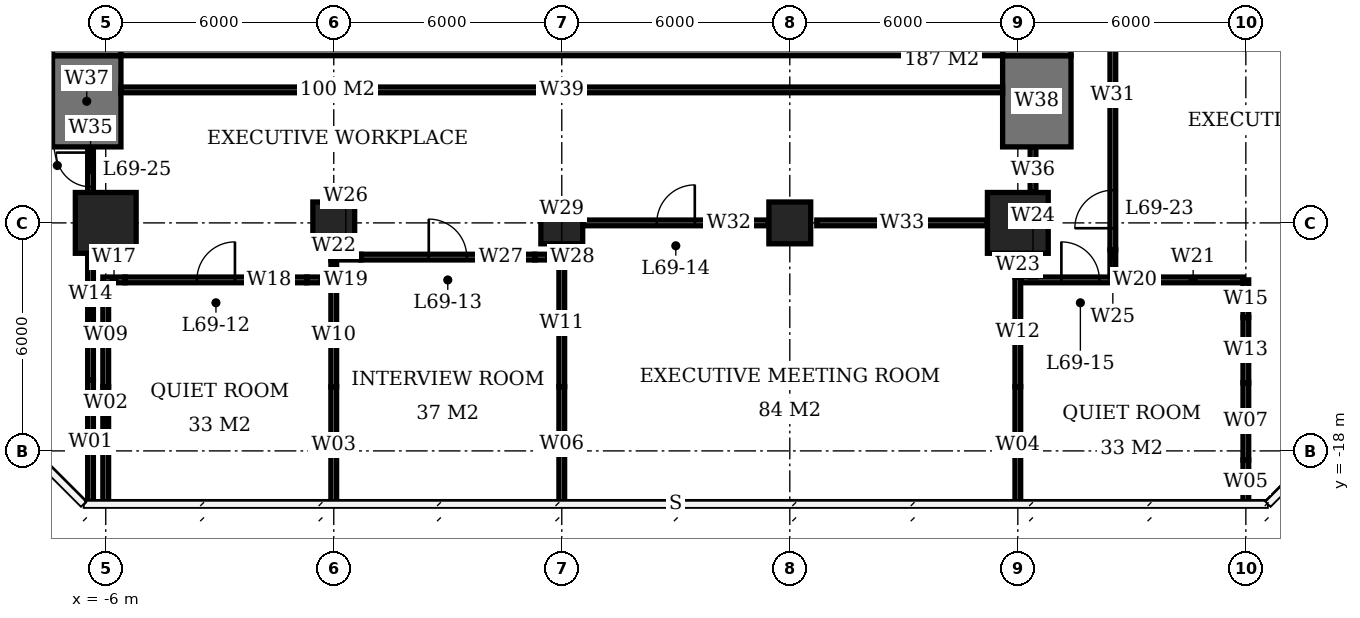
"""IFC4 building model, lengths in metres.
Left out: names, types, materials, properties, quantities, classifications, styles, units other than length and angle.
Written with IfcOpenShell. Run it as: python <this file> out.ifc"""

import sys

from ifc_helpers import new_model, si_unit, direction, frame, frame_2d, origin, origin_2d, place, context, subcontext, project, spatial, rectangle, extrude, element, fill, save


model = new_model("IFC4")
c1 = context("Model", 3, precision=1e-05, world=origin(), true_north=direction((0.0, 1.0)))
c2 = subcontext(c1, "Body", "Model", "MODEL_VIEW")
j1 = project(units=[si_unit("LENGTHUNIT", "METRE"), si_unit("PLANEANGLEUNIT", "RADIAN")], contexts=[c1])
p1 = place(None, origin())
s1 = spatial("IfcSite", under=j1, at=p1, CompositionType="ELEMENT")
p2 = place(p1, origin())
s2 = spatial("IfcBuilding", under=s1, at=p2, CompositionType="ELEMENT")
p3 = place(p2, frame((0.0, 0.0, 280.1)))
s3 = spatial("IfcBuildingStorey", under=s2, at=p3, CompositionType="ELEMENT", Elevation=280.1)
p4 = place(p3, frame((-6.0, -12.0, 0.0), z_axis=(0.0, 0.0, 1.0), x_axis=(1.0, 0.0, 0.0)))
e1 = element("IfcColumn", 1, at=p4, inside=s3, PredefinedType="COLUMN", context=c2, shape_type="SweptSolid", body=[
    extrude(rectangle(XDim=1.6, YDim=1.6, at=origin_2d()), origin(), (0.0, 0.0, 1.0), 3.9),
])
for number, where, z_axis, x_axis in (
    (2, (0.0, -12.0, 0.0), (0.0, 0.0, 1.0), (1.0, 0.0, 0.0)),
    (3, (6.0, -12.0, 0.0), (0.0, 0.0, 1.0), (1.0, 0.0, 0.0)),
    (4, (12.0, -12.0, 0.0), (0.0, 0.0, 1.0), (1.0, 0.0, 0.0)),
):
    element("IfcColumn", number, at=place(p3, frame(where, z_axis=z_axis, x_axis=x_axis)), inside=s3, PredefinedType="COLUMN", context=c2, shape_type="SweptSolid", body=[
        extrude(rectangle(XDim=1.1, YDim=1.1, at=origin_2d()), origin(), (0.0, 0.0, 1.0), 3.9),
    ])
p5 = place(p3, frame((18.0, -12.0, 0.0), z_axis=(0.0, 0.0, 1.0), x_axis=(1.0, 0.0, 0.0)))
e5 = element("IfcColumn", 5, at=p5, inside=s3, PredefinedType="COLUMN", context=c2, shape_type="SweptSolid", body=[
    extrude(rectangle(XDim=1.6, YDim=1.6, at=origin_2d()), origin(), (0.0, 0.0, 1.0), 3.9),
])
p6 = place(p3, frame((-5.6, -6.6, 0.0), z_axis=(0.0, 0.0, 1.0), x_axis=(1.0, 0.0, 0.0)))
e6 = element("IfcWall", 6, at=p6, inside=s3, PredefinedType="SHEAR", context=c2, shape_type="SweptSolid", body=[
    extrude(rectangle(XDim=23.2, YDim=2.0, at=frame_2d((11.6, 0.0))), origin(), (0.0, 0.0, 1.0), 3.9),
])
p7 = place(p3, frame((-6.5, -7.6, 0.0), z_axis=(0.0, 0.0, 1.0), x_axis=(0.0, 1.0, 0.0)))
e7 = element("IfcWall", 7, at=p7, inside=s3, PredefinedType="SHEAR", context=c2, shape_type="SweptSolid", body=[
    extrude(rectangle(XDim=21.2, YDim=1.8, at=frame_2d((10.6, 0.0))), origin(), (0.0, 0.0, 1.0), 3.9),
])
p8 = place(p7, frame((7.8, 0.0, 0.0)))
e8 = element("IfcOpeningElement", 8, at=p8, cuts=e7, PredefinedType="OPENING", context=c2, shape_type="SweptSolid", body=[
    extrude(rectangle(XDim=1.8, YDim=2.4, at=frame_2d((0.9, 1.2))), frame((0.0, 0.91, 0.0), z_axis=(0.0, -1.0, 0.0), x_axis=(1.0, 0.0, 0.0)), (0.0, 0.0, 1.0), 1.82),
])
p9 = place(p3, frame((18.5, -7.6, 0.0), z_axis=(0.0, 0.0, 1.0), x_axis=(0.0, 1.0, 0.0)))
e9 = element("IfcWall", 9, at=p9, inside=s3, PredefinedType="SHEAR", context=c2, shape_type="SweptSolid", body=[
    extrude(rectangle(XDim=21.2, YDim=1.8, at=frame_2d((10.6, 0.0))), origin(), (0.0, 0.0, 1.0), 3.9),
])
p10 = place(p9, frame((9.2, 0.0, 0.0)))
e10 = element("IfcOpeningElement", 10, at=p10, cuts=e9, PredefinedType="OPENING", context=c2, shape_type="SweptSolid", body=[
    extrude(rectangle(XDim=1.8, YDim=2.4, at=frame_2d((0.9, 1.2))), frame((0.0, 0.91, 0.0), z_axis=(0.0, -1.0, 0.0), x_axis=(1.0, 0.0, 0.0)), (0.0, 0.0, 1.0), 1.82),
])
for number, where, z_axis, x_axis in (
    (11, (-6.5, -10.0, 0.0), (0.0, 0.0, 1.0), (0.0, 1.0, 0.0)),
    (12, (18.5, -10.0, 0.0), (0.0, 0.0, 1.0), (0.0, 1.0, 0.0)),
):
    element("IfcWall", number, at=place(p3, frame(where, z_axis=z_axis, x_axis=x_axis)), inside=s3, PredefinedType="SHEAR", context=c2, shape_type="SweptSolid", body=[
        extrude(rectangle(XDim=2.4, YDim=1.8, at=frame_2d((1.2, 0.0))), origin(), (0.0, 0.0, 1.0), 3.9),
    ])
p11 = place(p3, frame((-6.075, -13.5, 0.0), z_axis=(0.0, 0.0, 1.0), x_axis=(1.0, 0.0, 0.0)))
e13 = element("IfcWall", 13, at=p11, inside=s3, PredefinedType="PARTITIONING", context=c2, shape_type="SweptSolid", body=[
    extrude(rectangle(XDim=0.585, YDim=0.15, at=frame_2d((0.292, 0.0))), origin(), (0.0, 0.0, 1.0), 2.65),
])
p12 = place(p3, frame((-5.49, -13.5, 0.0), z_axis=(0.0, 0.0, 1.0), x_axis=(1.0, 0.0, 0.0)))
e14 = element("IfcWall", 14, at=p12, inside=s3, PredefinedType="PARTITIONING", context=c2, shape_type="SweptSolid", body=[
    extrude(rectangle(XDim=4.78, YDim=0.15, at=frame_2d((2.39, 0.0))), origin(), (0.0, 0.0, 1.0), 3.65),
])
p13 = place(p12, frame((1.89, 0.0, 0.0)))
e15 = element("IfcOpeningElement", 15, at=p13, cuts=e14, PredefinedType="OPENING", context=c2, shape_type="SweptSolid", body=[
    extrude(rectangle(XDim=1.0, YDim=2.4, at=frame_2d((0.5, 1.2))), frame((0.0, 0.085, 0.0), z_axis=(0.0, -1.0, 0.0), x_axis=(1.0, 0.0, 0.0)), (0.0, 0.0, 1.0), 0.17),
])
p14 = place(p3, frame((-0.71, -13.5, 0.0), z_axis=(0.0, 0.0, 1.0), x_axis=(1.0, 0.0, 0.0)))
e16 = element("IfcWall", 16, at=p14, inside=s3, PredefinedType="PARTITIONING", context=c2, shape_type="SweptSolid", body=[
    extrude(rectangle(XDim=0.86, YDim=0.15, at=frame_2d((0.43, 0.0))), origin(), (0.0, 0.0, 1.0), 2.65),
])
p15 = place(p3, frame((18.075, -13.5, 0.0), z_axis=(0.0, 0.0, 1.0), x_axis=(1.0, 0.0, 0.0)))
e17 = element("IfcWall", 17, at=p15, inside=s3, PredefinedType="PARTITIONING", context=c2, shape_type="SweptSolid", body=[
    extrude(rectangle(XDim=3.217, YDim=0.15, at=frame_2d((1.608, 0.0))), origin(), (0.0, 0.0, 1.0), 2.65),
])
p16 = place(p15, frame((1.071, 0.0, 0.0)))
e18 = element("IfcOpeningElement", 18, at=p16, cuts=e17, PredefinedType="OPENING", context=c2, shape_type="SweptSolid", body=[
    extrude(rectangle(XDim=1.0, YDim=2.4, at=frame_2d((0.5, 1.2))), frame((0.0, 0.085, 0.0), z_axis=(0.0, -1.0, 0.0), x_axis=(1.0, 0.0, 0.0)), (0.0, 0.0, 1.0), 0.17),
])
p17 = place(p3, frame((21.292, -13.5, 0.0), z_axis=(0.0, 0.0, 1.0), x_axis=(1.0, 0.0, 0.0)))
e19 = element("IfcWall", 19, at=p17, inside=s3, PredefinedType="PARTITIONING", context=c2, shape_type="SweptSolid", body=[
    extrude(rectangle(XDim=2.643, YDim=0.15, at=frame_2d((1.322, 0.0))), origin(), (0.0, 0.0, 1.0), 3.65),
])
p18 = place(p3, frame((-0.075, -12.9, 0.0), z_axis=(0.0, 0.0, 1.0), x_axis=(1.0, 0.0, 0.0)))
e20 = element("IfcWall", 20, at=p18, inside=s3, PredefinedType="PARTITIONING", context=c2, shape_type="SweptSolid", body=[
    extrude(rectangle(XDim=0.785, YDim=0.15, at=frame_2d((0.393, 0.0))), origin(), (0.0, 0.0, 1.0), 2.65),
])
p19 = place(p3, frame((0.71, -12.9, 0.0), z_axis=(0.0, 0.0, 1.0), x_axis=(1.0, 0.0, 0.0)))
e21 = element("IfcWall", 21, at=p19, inside=s3, PredefinedType="PARTITIONING", context=c2, shape_type="SweptSolid", body=[
    extrude(rectangle(XDim=4.58, YDim=0.15, at=frame_2d((2.29, 0.0))), origin(), (0.0, 0.0, 1.0), 3.65),
])
p20 = place(p19, frame((1.79, 0.0, 0.0)))
e22 = element("IfcOpeningElement", 22, at=p20, cuts=e21, PredefinedType="OPENING", context=c2, shape_type="SweptSolid", body=[
    extrude(rectangle(XDim=1.0, YDim=2.4, at=frame_2d((0.5, 1.2))), frame((0.0, 0.085, 0.0), z_axis=(0.0, -1.0, 0.0), x_axis=(1.0, 0.0, 0.0)), (0.0, 0.0, 1.0), 0.17),
])
p21 = place(p3, frame((5.29, -12.9, 0.0), z_axis=(0.0, 0.0, 1.0), x_axis=(1.0, 0.0, 0.0)))
e23 = element("IfcWall", 23, at=p21, inside=s3, PredefinedType="PARTITIONING", context=c2, shape_type="SweptSolid", body=[
    extrude(rectangle(XDim=0.785, YDim=0.15, at=frame_2d((0.393, 0.0))), origin(), (0.0, 0.0, 1.0), 2.65),
])
p22 = place(p3, frame((6.56, -12.0, 0.0), z_axis=(0.0, 0.0, 1.0), x_axis=(1.0, 0.0, 0.0)))
e24 = element("IfcWall", 24, at=p22, inside=s3, PredefinedType="PARTITIONING", context=c2, shape_type="SweptSolid", body=[
    extrude(rectangle(XDim=4.88, YDim=0.15, at=frame_2d((2.44, 0.0))), origin(), (0.0, 0.0, 1.0), 3.65),
])
p23 = place(p22, frame((1.94, 0.0, 0.0)))
e25 = element("IfcOpeningElement", 25, at=p23, cuts=e24, PredefinedType="OPENING", context=c2, shape_type="SweptSolid", body=[
    extrude(rectangle(XDim=1.0, YDim=2.4, at=frame_2d((0.5, 1.2))), frame((0.0, 0.085, 0.0), z_axis=(0.0, -1.0, 0.0), x_axis=(1.0, 0.0, 0.0)), (0.0, 0.0, 1.0), 0.17),
])
p24 = place(p3, frame((12.71, -12.0, 0.0), z_axis=(0.0, 0.0, 1.0), x_axis=(1.0, 0.0, 0.0)))
e26 = element("IfcWall", 26, at=p24, inside=s3, PredefinedType="PARTITIONING", context=c2, shape_type="SweptSolid", body=[
    extrude(rectangle(XDim=4.49, YDim=0.15, at=frame_2d((2.245, 0.0))), origin(), (0.0, 0.0, 1.0), 3.65),
])
p25 = place(p3, frame((-6.0, -19.375, 0.0), z_axis=(0.0, 0.0, 1.0), x_axis=(0.0, 1.0, 0.0)))
e27 = element("IfcWall", 27, at=p25, inside=s3, PredefinedType="PARTITIONING", context=c2, shape_type="SweptSolid", body=[
    extrude(rectangle(XDim=3.065, YDim=0.15, at=frame_2d((1.532, 0.0))), origin(), (0.0, 0.0, 1.0), 3.65),
])
p26 = place(p3, frame((-6.0, -16.31, 0.0), z_axis=(0.0, 0.0, 1.0), x_axis=(0.0, 1.0, 0.0)))
e28 = element("IfcWall", 28, at=p26, inside=s3, PredefinedType="PARTITIONING", context=c2, shape_type="SweptSolid", body=[
    extrude(rectangle(XDim=2.735, YDim=0.15, at=frame_2d((1.368, 0.0))), origin(), (0.0, 0.0, 1.0), 2.65),
])
p27 = place(p3, frame((0.0, -19.375, 0.0), z_axis=(0.0, 0.0, 1.0), x_axis=(0.0, 1.0, 0.0)))
e29 = element("IfcWall", 29, at=p27, inside=s3, PredefinedType="PARTITIONING", context=c2, shape_type="SweptSolid", body=[
    extrude(rectangle(XDim=3.065, YDim=0.15, at=frame_2d((1.532, 0.0))), origin(), (0.0, 0.0, 1.0), 3.65),
])
p28 = place(p3, frame((0.0, -16.31, 0.0), z_axis=(0.0, 0.0, 1.0), x_axis=(0.0, 1.0, 0.0)))
e30 = element("IfcWall", 30, at=p28, inside=s3, PredefinedType="PARTITIONING", context=c2, shape_type="SweptSolid", body=[
    extrude(rectangle(XDim=2.735, YDim=0.15, at=frame_2d((1.368, 0.0))), origin(), (0.0, 0.0, 1.0), 2.65),
])
p29 = place(p3, frame((0.0, -13.425, 0.0), z_axis=(0.0, 0.0, 1.0), x_axis=(0.0, 1.0, 0.0)))
e31 = element("IfcWall", 31, at=p29, inside=s3, PredefinedType="PARTITIONING", context=c2, shape_type="SweptSolid", body=[
    extrude(rectangle(XDim=0.45, YDim=0.15, at=frame_2d((0.225, 0.0))), origin(), (0.0, 0.0, 1.0), 2.65),
])
p30 = place(p3, frame((6.0, -19.35, 0.0), z_axis=(0.0, 0.0, 1.0), x_axis=(0.0, 1.0, 0.0)))
e32 = element("IfcWall", 32, at=p30, inside=s3, PredefinedType="PARTITIONING", context=c2, shape_type="SweptSolid", body=[
    extrude(rectangle(XDim=3.04, YDim=0.15, at=frame_2d((1.52, 0.0))), origin(), (0.0, 0.0, 1.0), 3.65),
])
p31 = place(p3, frame((6.0, -16.31, 0.0), z_axis=(0.0, 0.0, 1.0), x_axis=(0.0, 1.0, 0.0)))
e33 = element("IfcWall", 33, at=p31, inside=s3, PredefinedType="PARTITIONING", context=c2, shape_type="SweptSolid", body=[
    extrude(rectangle(XDim=3.335, YDim=0.15, at=frame_2d((1.667, 0.0))), origin(), (0.0, 0.0, 1.0), 2.65),
])
p32 = place(p3, frame((6.0, -12.9, 0.0), z_axis=(0.0, 0.0, 1.0), x_axis=(0.0, 1.0, 0.0)))
e34 = element("IfcWall", 34, at=p32, inside=s3, PredefinedType="PARTITIONING", context=c2, shape_type="SweptSolid", body=[
    extrude(rectangle(XDim=0.35, YDim=0.15, at=frame_2d((0.175, 0.0))), origin(), (0.0, 0.0, 1.0), 2.65),
])
p33 = place(p3, frame((18.0, -19.375, 0.0), z_axis=(0.0, 0.0, 1.0), x_axis=(0.0, 1.0, 0.0)))
e35 = element("IfcWall", 35, at=p33, inside=s3, PredefinedType="PARTITIONING", context=c2, shape_type="SweptSolid", body=[
    extrude(rectangle(XDim=3.065, YDim=0.15, at=frame_2d((1.532, 0.0))), origin(), (0.0, 0.0, 1.0), 3.65),
])
p34 = place(p3, frame((18.0, -16.31, 0.0), z_axis=(0.0, 0.0, 1.0), x_axis=(0.0, 1.0, 0.0)))
e36 = element("IfcWall", 36, at=p34, inside=s3, PredefinedType="PARTITIONING", context=c2, shape_type="SweptSolid", body=[
    extrude(rectangle(XDim=2.885, YDim=0.15, at=frame_2d((1.442, 0.0))), origin(), (0.0, 0.0, 1.0), 2.65),
])
p35 = place(p3, frame((18.0, -13.425, 0.0), z_axis=(0.0, 0.0, 1.0), x_axis=(0.0, 1.0, 0.0)))
e37 = element("IfcWall", 37, at=p35, inside=s3, PredefinedType="PARTITIONING", context=c2, shape_type="SweptSolid", body=[
    extrude(rectangle(XDim=0.625, YDim=0.15, at=frame_2d((0.312, 0.0))), origin(), (0.0, 0.0, 1.0), 2.65),
])
p36 = place(p3, frame((24.0, -19.375, 0.0), z_axis=(0.0, 0.0, 1.0), x_axis=(0.0, 1.0, 0.0)))
e38 = element("IfcWall", 38, at=p36, inside=s3, PredefinedType="PARTITIONING", context=c2, shape_type="SweptSolid", body=[
    extrude(rectangle(XDim=1.138, YDim=0.15, at=frame_2d((0.569, 0.0))), origin(), (0.0, 0.0, 1.0), 3.65),
])
p37 = place(p3, frame((24.0, -18.237, 0.0), z_axis=(0.0, 0.0, 1.0), x_axis=(0.0, 1.0, 0.0)))
e39 = element("IfcWall", 39, at=p37, inside=s3, PredefinedType="PARTITIONING", context=c2, shape_type="SweptSolid", body=[
    extrude(rectangle(XDim=2.029, YDim=0.15, at=frame_2d((1.015, 0.0))), origin(), (0.0, 0.0, 1.0), 2.65),
])
p38 = place(p3, frame((24.0, -16.208, 0.0), z_axis=(0.0, 0.0, 1.0), x_axis=(0.0, 1.0, 0.0)))
e40 = element("IfcWall", 40, at=p38, inside=s3, PredefinedType="PARTITIONING", context=c2, shape_type="SweptSolid", body=[
    extrude(rectangle(XDim=1.718, YDim=0.15, at=frame_2d((0.859, 0.0))), origin(), (0.0, 0.0, 1.0), 3.65),
])
p39 = place(p3, frame((24.0, -14.49, 0.0), z_axis=(0.0, 0.0, 1.0), x_axis=(0.0, 1.0, 0.0)))
e41 = element("IfcWall", 41, at=p39, inside=s3, PredefinedType="PARTITIONING", context=c2, shape_type="SweptSolid", body=[
    extrude(rectangle(XDim=0.99, YDim=0.15, at=frame_2d((0.495, 0.0))), origin(), (0.0, 0.0, 1.0), 2.65),
])
p40 = place(p3, frame((-6.4, -19.375, 0.0), z_axis=(0.0, 0.0, 1.0), x_axis=(0.0, 1.0, 0.0)))
e42 = element("IfcWall", 42, at=p40, inside=s3, PredefinedType="PARTITIONING", context=c2, shape_type="SweptSolid", body=[
    extrude(rectangle(XDim=3.235, YDim=0.15, at=frame_2d((1.618, 0.0))), origin(), (0.0, 0.0, 1.0), 3.65),
])
p41 = place(p3, frame((-6.4, -16.14, 0.0), z_axis=(0.0, 0.0, 1.0), x_axis=(0.0, 1.0, 0.0)))
e43 = element("IfcWall", 43, at=p41, inside=s3, PredefinedType="PARTITIONING", context=c2, shape_type="SweptSolid", body=[
    extrude(rectangle(XDim=3.34, YDim=0.15, at=frame_2d((1.67, 0.0))), origin(), (0.0, 0.0, 1.0), 2.65),
])
p42 = place(p3, frame((-6.4, -11.2, 0.0), z_axis=(0.0, 0.0, 1.0), x_axis=(0.0, 1.0, 0.0)))
e44 = element("IfcWall", 44, at=p42, inside=s3, PredefinedType="PARTITIONING", context=c2, shape_type="SweptSolid", body=[
    extrude(rectangle(XDim=1.2, YDim=0.15, at=frame_2d((0.6, 0.0))), origin(), (0.0, 0.0, 1.0), 3.65),
])
p43 = place(p42, frame((0.15, 0.0, 0.0)))
e45 = element("IfcOpeningElement", 45, at=p43, cuts=e44, PredefinedType="OPENING", context=c2, shape_type="SweptSolid", body=[
    extrude(rectangle(XDim=0.9, YDim=2.1, at=frame_2d((0.45, 1.05))), frame((0.0, 0.085, 0.0), z_axis=(0.0, -1.0, 0.0), x_axis=(1.0, 0.0, 0.0)), (0.0, 0.0, 1.0), 0.17),
])
p44 = place(p3, frame((-5.6, -8.5, 0.0), z_axis=(0.0, 0.0, 1.0), x_axis=(1.0, 0.0, 0.0)))
e46 = element("IfcWall", 46, at=p44, inside=s3, PredefinedType="PARTITIONING", context=c2, shape_type="SweptSolid", body=[
    extrude(rectangle(XDim=23.2, YDim=0.15, at=frame_2d((11.6, 0.0))), origin(), (0.0, 0.0, 1.0), 3.65),
])
p45 = place(p3, frame((18.4, -13.425, 0.0), z_axis=(0.0, 0.0, 1.0), x_axis=(0.0, 1.0, 0.0)))
e47 = element("IfcWall", 47, at=p45, inside=s3, PredefinedType="PARTITIONING", context=c2, shape_type="SweptSolid", body=[
    extrude(rectangle(XDim=0.625, YDim=0.15, at=frame_2d((0.312, 0.0))), origin(), (0.0, 0.0, 1.0), 2.65),
])
p46 = place(p3, frame((18.4, -11.2, 0.0), z_axis=(0.0, 0.0, 1.0), x_axis=(0.0, 1.0, 0.0)))
e48 = element("IfcWall", 48, at=p46, inside=s3, PredefinedType="PARTITIONING", context=c2, shape_type="SweptSolid", body=[
    extrude(rectangle(XDim=1.2, YDim=0.15, at=frame_2d((0.6, 0.0))), origin(), (0.0, 0.0, 1.0), 3.65),
])
p47 = place(p3, frame((20.5, -13.425, 0.0), z_axis=(0.0, 0.0, 1.0), x_axis=(0.0, 1.0, 0.0)))
e49 = element("IfcWall", 49, at=p47, inside=s3, PredefinedType="PARTITIONING", context=c2, shape_type="SweptSolid", body=[
    extrude(rectangle(XDim=0.717, YDim=0.15, at=frame_2d((0.358, 0.0))), origin(), (0.0, 0.0, 1.0), 2.65),
])
p48 = place(p3, frame((20.5, -12.708, 0.0), z_axis=(0.0, 0.0, 1.0), x_axis=(0.0, 1.0, 0.0)))
e50 = element("IfcWall", 50, at=p48, inside=s3, PredefinedType="PARTITIONING", context=c2, shape_type="SweptSolid", body=[
    extrude(rectangle(XDim=8.133, YDim=0.15, at=frame_2d((4.066, 0.0))), origin(), (0.0, 0.0, 1.0), 3.65),
])
p49 = place(p48, frame((0.568, 0.0, 0.0)))
e51 = element("IfcOpeningElement", 51, at=p49, cuts=e50, PredefinedType="OPENING", context=c2, shape_type="SweptSolid", body=[
    extrude(rectangle(XDim=1.0, YDim=2.4, at=frame_2d((0.5, 1.2))), frame((0.0, 0.085, 0.0), z_axis=(0.0, -1.0, 0.0), x_axis=(1.0, 0.0, 0.0)), (0.0, 0.0, 1.0), 0.17),
])
p50 = place(p13, origin())
e52 = element("IfcDoor", 52, at=p50, inside=s3, OperationType="SINGLE_SWING_RIGHT", PredefinedType="DOOR", context=c2, shape_type="SweptSolid", body=[
    extrude(rectangle(XDim=1.0, YDim=2.4, at=frame_2d((0.5, 1.2))), frame((0.0, 0.025, 0.0), z_axis=(0.0, -1.0, 0.0), x_axis=(1.0, 0.0, 0.0)), (0.0, 0.0, 1.0), 0.05),
])
fill(e15, e52)
p51 = place(p20, origin())
e53 = element("IfcDoor", 53, at=p51, inside=s3, OperationType="SINGLE_SWING_LEFT", PredefinedType="DOOR", context=c2, shape_type="SweptSolid", body=[
    extrude(rectangle(XDim=1.0, YDim=2.4, at=frame_2d((0.5, 1.2))), frame((0.0, 0.025, 0.0), z_axis=(0.0, -1.0, 0.0), x_axis=(1.0, 0.0, 0.0)), (0.0, 0.0, 1.0), 0.05),
])
fill(e22, e53)
p52 = place(p23, origin())
e54 = element("IfcDoor", 54, at=p52, inside=s3, OperationType="SINGLE_SWING_RIGHT", PredefinedType="DOOR", context=c2, shape_type="SweptSolid", body=[
    extrude(rectangle(XDim=1.0, YDim=2.4, at=frame_2d((0.5, 1.2))), frame((0.0, 0.025, 0.0), z_axis=(0.0, -1.0, 0.0), x_axis=(1.0, 0.0, 0.0)), (0.0, 0.0, 1.0), 0.05),
])
fill(e25, e54)
p53 = place(p16, origin())
e55 = element("IfcDoor", 55, at=p53, inside=s3, OperationType="SINGLE_SWING_LEFT", PredefinedType="DOOR", context=c2, shape_type="SweptSolid", body=[
    extrude(rectangle(XDim=1.0, YDim=2.4, at=frame_2d((0.5, 1.2))), frame((0.0, 0.025, 0.0), z_axis=(0.0, -1.0, 0.0), x_axis=(1.0, 0.0, 0.0)), (0.0, 0.0, 1.0), 0.05),
])
fill(e18, e55)
p54 = place(p49, origin())
e56 = element("IfcDoor", 56, at=p54, inside=s3, OperationType="SINGLE_SWING_LEFT", PredefinedType="DOOR", context=c2, shape_type="SweptSolid", body=[
    extrude(rectangle(XDim=1.0, YDim=2.4, at=frame_2d((0.5, 1.2))), frame((0.0, 0.025, 0.0), z_axis=(0.0, -1.0, 0.0), x_axis=(1.0, 0.0, 0.0)), (0.0, 0.0, 1.0), 0.05),
])
fill(e51, e56)
p55 = place(p43, origin())
e57 = element("IfcDoor", 57, at=p55, inside=s3, OperationType="SINGLE_SWING_RIGHT", PredefinedType="DOOR", context=c2, shape_type="SweptSolid", body=[
    extrude(rectangle(XDim=0.9, YDim=2.1, at=frame_2d((0.45, 1.05))), frame((0.0, 0.025, 0.0), z_axis=(0.0, -1.0, 0.0), x_axis=(1.0, 0.0, 0.0)), (0.0, 0.0, 1.0), 0.05),
])
fill(e45, e57)
save(model, sys.argv[1])
